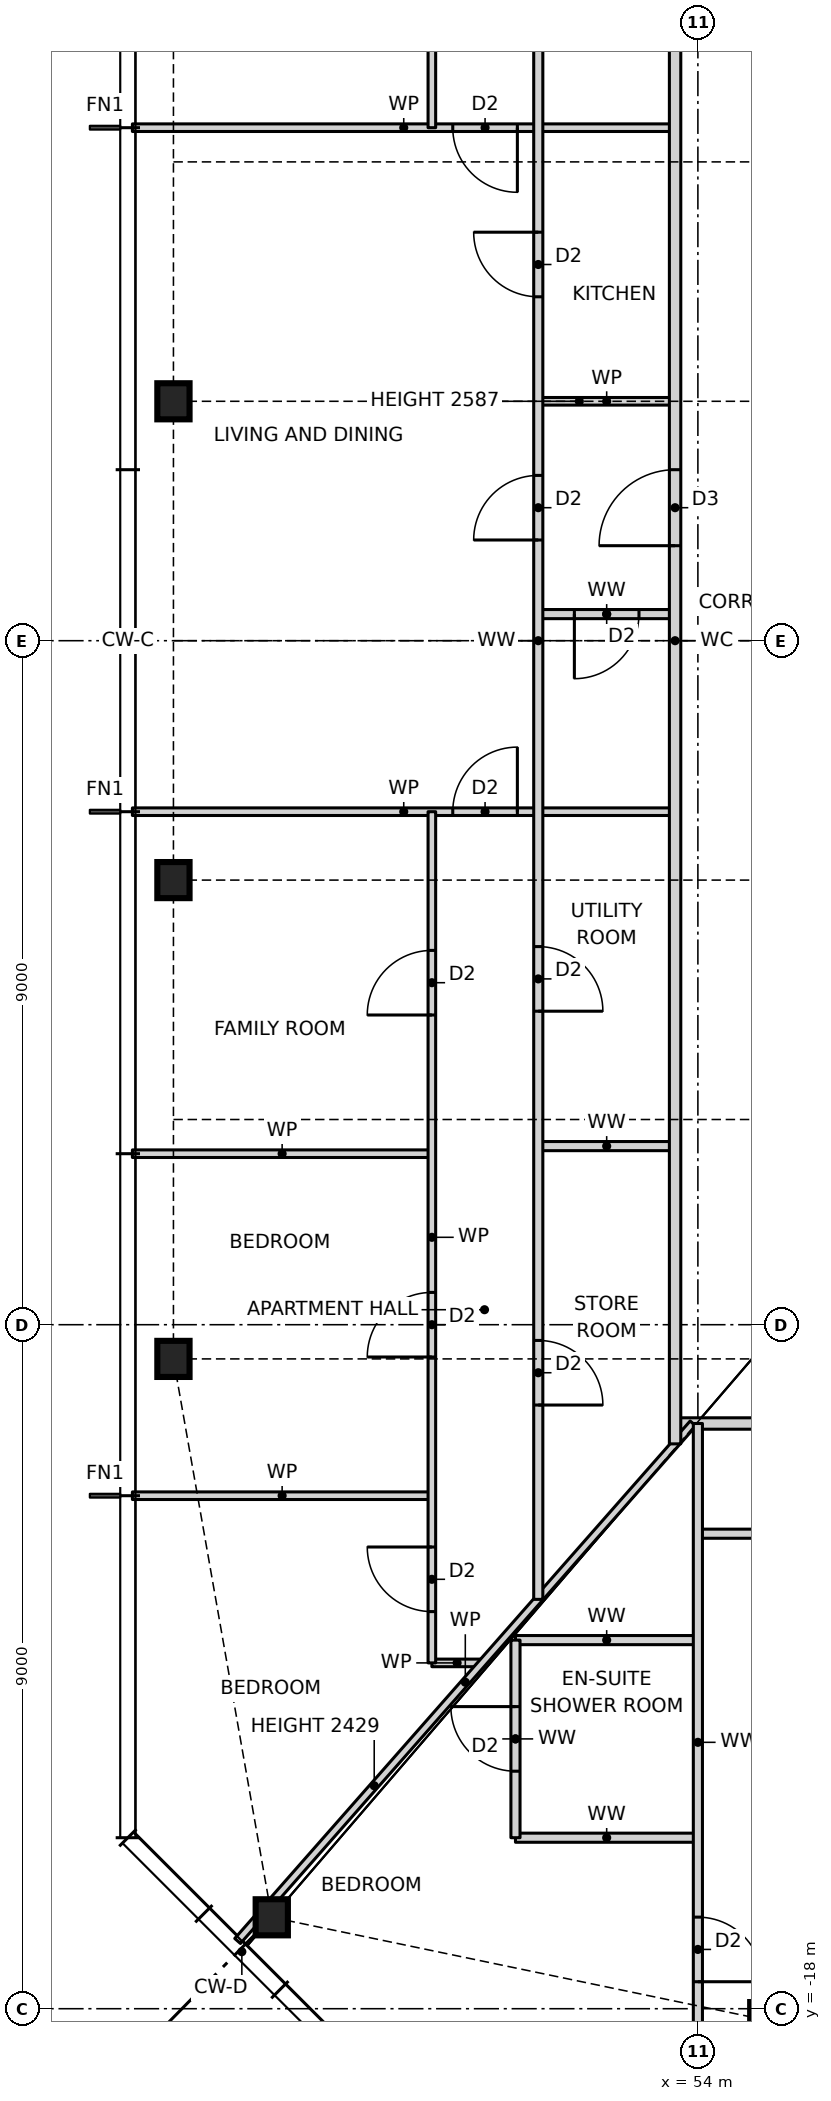
"""IFC4 building model, lengths in metres.
Left out: names, types, materials, properties, quantities, classifications, styles, units other than length and angle.
Written with IfcOpenShell. Run it as: python <this file> out.ifc"""

import sys

from ifc_helpers import new_model, si_unit, direction, frame, frame_2d, origin, origin_2d, place, context, subcontext, project, spatial, rectangle, i_section, extrude, element, fill, save


model = new_model("IFC4")
c1 = context("Model", 3, precision=1e-05, world=origin(), true_north=direction((0.0, 1.0)))
c2 = subcontext(c1, "Body", "Model", "MODEL_VIEW")
j1 = project(units=[si_unit("LENGTHUNIT", "METRE"), si_unit("PLANEANGLEUNIT", "RADIAN")], contexts=[c1])
p1 = place(None, origin())
s1 = spatial("IfcSite", under=j1, at=p1, CompositionType="ELEMENT")
p2 = place(p1, origin())
s2 = spatial("IfcBuilding", under=s1, at=p2, CompositionType="ELEMENT")
p3 = place(p2, frame((0.0, 0.0, 32.5)))
s3 = spatial("IfcBuildingStorey", under=s2, at=p3, CompositionType="ELEMENT", Elevation=32.5)
for number, where, z_axis, x_axis in (
    (1, (48.394, -16.797, 0.0), (0.0, 0.0, 1.0), (1.0, 0.0, 0.0)),
    (2, (54.9, -18.15, 0.0), (0.0, 0.0, 1.0), (1.0, 0.0, 0.0)),
    (3, (47.1, 3.15, 0.0), (0.0, 0.0, 1.0), (1.0, 0.0, 0.0)),
    (4, (47.1, -3.15, 0.0), (0.0, 0.0, 1.0), (1.0, 0.0, 0.0)),
    (5, (47.1, -9.45, 0.0), (0.0, 0.0, 1.0), (1.0, 0.0, 0.0)),
):
    element("IfcColumn", number, at=place(p3, frame(where, z_axis=z_axis, x_axis=x_axis)), inside=s3, PredefinedType="COLUMN", context=c2, shape_type="SweptSolid", body=[
        extrude(i_section(OverallWidth=0.424, OverallDepth=0.475, WebThickness=0.048, FlangeThickness=0.077, at=origin_2d()), origin(), (0.0, 0.0, 1.0), 3.5),
    ])
p4 = place(p3, frame((51.6, -15.75, 0.0), z_axis=(0.0, 0.0, 1.0), x_axis=(1.0, 0.0, 0.0)))
e6 = element("IfcWall", 6, at=p4, inside=s3, PredefinedType="PARTITIONING", context=c2, shape_type="SweptSolid", body=[
    extrude(rectangle(XDim=2.4, YDim=0.12, at=frame_2d((1.2, 0.0))), origin(), (0.0, 0.0, 1.0), 3.27),
])
p5 = place(p3, frame((50.5, -13.45, 0.0), z_axis=(0.0, 0.0, 1.0), x_axis=(1.0, 0.0, 0.0)))
e7 = element("IfcWall", 7, at=p5, inside=s3, PredefinedType="PARTITIONING", context=c2, shape_type="SweptSolid", body=[
    extrude(rectangle(XDim=0.664, YDim=0.1, at=frame_2d((0.332, 0.0))), origin(), (0.0, 0.0, 1.0), 3.27),
])
p6 = place(p3, frame((51.6, -13.15, 0.0), z_axis=(0.0, 0.0, 1.0), x_axis=(1.0, 0.0, 0.0)))
e8 = element("IfcWall", 8, at=p6, inside=s3, PredefinedType="PARTITIONING", context=c2, shape_type="SweptSolid", body=[
    extrude(rectangle(XDim=2.4, YDim=0.12, at=frame_2d((1.2, 0.0))), origin(), (0.0, 0.0, 1.0), 3.27),
])
p7 = place(p3, frame((54.0, -11.75, 0.0), z_axis=(0.0, 0.0, 1.0), x_axis=(1.0, 0.0, 0.0)))
e9 = element("IfcWall", 9, at=p7, inside=s3, PredefinedType="PARTITIONING", context=c2, shape_type="SweptSolid", body=[
    extrude(rectangle(XDim=19.34, YDim=0.12, at=frame_2d((9.67, 0.0))), origin(), (0.0, 0.0, 1.0), 3.27),
])
p8 = place(p7, frame((1.375, 0.0, 0.0)))
e10 = element("IfcOpeningElement", 10, at=p8, cuts=e9, PredefinedType="OPENING", context=c2, shape_type="SweptSolid", body=[
    extrude(rectangle(XDim=0.85, YDim=2.1, at=frame_2d((0.425, 1.05))), frame((0.0, 0.07, 0.0), z_axis=(0.0, -1.0, 0.0), x_axis=(1.0, 0.0, 0.0)), (0.0, 0.0, 1.0), 0.14),
])
p9 = place(p7, frame((4.575, 0.0, 0.0)))
e11 = element("IfcOpeningElement", 11, at=p9, cuts=e9, PredefinedType="OPENING", context=c2, shape_type="SweptSolid", body=[
    extrude(rectangle(XDim=0.85, YDim=2.1, at=frame_2d((0.425, 1.05))), frame((0.0, 0.07, 0.0), z_axis=(0.0, -1.0, 0.0), x_axis=(1.0, 0.0, 0.0)), (0.0, 0.0, 1.0), 0.14),
])
p10 = place(p7, frame((11.325, 0.0, 0.0)))
e12 = element("IfcOpeningElement", 12, at=p10, cuts=e9, PredefinedType="OPENING", context=c2, shape_type="SweptSolid", body=[
    extrude(rectangle(XDim=0.85, YDim=2.1, at=frame_2d((0.425, 1.05))), frame((0.0, 0.07, 0.0), z_axis=(0.0, -1.0, 0.0), x_axis=(1.0, 0.0, 0.0)), (0.0, 0.0, 1.0), 0.14),
])
p11 = place(p7, frame((16.495, 0.0, 0.0)))
e13 = element("IfcOpeningElement", 13, at=p11, cuts=e9, PredefinedType="OPENING", context=c2, shape_type="SweptSolid", body=[
    extrude(rectangle(XDim=0.85, YDim=2.1, at=frame_2d((0.425, 1.05))), frame((0.0, 0.07, 0.0), z_axis=(0.0, -1.0, 0.0), x_axis=(1.0, 0.0, 0.0)), (0.0, 0.0, 1.0), 0.14),
])
p12 = place(p3, frame((46.56, -11.25, 0.0), z_axis=(0.0, 0.0, 1.0), x_axis=(1.0, 0.0, 0.0)))
e14 = element("IfcWall", 14, at=p12, inside=s3, PredefinedType="PARTITIONING", context=c2, shape_type="SweptSolid", body=[
    extrude(rectangle(XDim=3.94, YDim=0.1, at=frame_2d((1.97, 0.0))), origin(), (0.0, 0.0, 1.0), 3.27),
])
p13 = place(p3, frame((53.7, -10.3, 0.0), z_axis=(0.0, 0.0, 1.0), x_axis=(1.0, 0.0, 0.0)))
e15 = element("IfcWall", 15, at=p13, inside=s3, PredefinedType="PARTITIONING", context=c2, shape_type="SweptSolid", body=[
    extrude(rectangle(XDim=18.6, YDim=0.15, at=frame_2d((9.3, 0.0))), origin(), (0.0, 0.0, 1.0), 3.27),
])
p14 = place(p13, frame((4.8, 0.0, 0.0)))
e16 = element("IfcOpeningElement", 16, at=p14, cuts=e15, PredefinedType="OPENING", context=c2, shape_type="SweptSolid", body=[
    extrude(rectangle(XDim=1.0, YDim=2.1, at=frame_2d((0.5, 1.05))), frame((0.0, 0.085, 0.0), z_axis=(0.0, -1.0, 0.0), x_axis=(1.0, 0.0, 0.0)), (0.0, 0.0, 1.0), 0.17),
])
p15 = place(p3, frame((46.56, -6.75, 0.0), z_axis=(0.0, 0.0, 1.0), x_axis=(1.0, 0.0, 0.0)))
e17 = element("IfcWall", 17, at=p15, inside=s3, PredefinedType="PARTITIONING", context=c2, shape_type="SweptSolid", body=[
    extrude(rectangle(XDim=3.94, YDim=0.1, at=frame_2d((1.97, 0.0))), origin(), (0.0, 0.0, 1.0), 3.27),
])
p16 = place(p3, frame((51.9, -6.65, 0.0), z_axis=(0.0, 0.0, 1.0), x_axis=(1.0, 0.0, 0.0)))
e18 = element("IfcWall", 18, at=p16, inside=s3, PredefinedType="PARTITIONING", context=c2, shape_type="SweptSolid", body=[
    extrude(rectangle(XDim=1.8, YDim=0.12, at=frame_2d((0.9, 0.0))), origin(), (0.0, 0.0, 1.0), 3.27),
])
p17 = place(p3, frame((46.56, -2.25, 0.0), z_axis=(0.0, 0.0, 1.0), x_axis=(1.0, 0.0, 0.0)))
e19 = element("IfcWall", 19, at=p17, inside=s3, PredefinedType="PARTITIONING", context=c2, shape_type="SweptSolid", body=[
    extrude(rectangle(XDim=7.14, YDim=0.1, at=frame_2d((3.57, 0.0))), origin(), (0.0, 0.0, 1.0), 3.27),
])
p18 = place(p17, frame((4.215, 0.0, 0.0)))
e20 = element("IfcOpeningElement", 20, at=p18, cuts=e19, PredefinedType="OPENING", context=c2, shape_type="SweptSolid", body=[
    extrude(rectangle(XDim=0.85, YDim=2.1, at=frame_2d((0.425, 1.05))), frame((0.0, 0.06, 0.0), z_axis=(0.0, -1.0, 0.0), x_axis=(1.0, 0.0, 0.0)), (0.0, 0.0, 1.0), 0.12),
])
p19 = place(p3, frame((51.9, 0.35, 0.0), z_axis=(0.0, 0.0, 1.0), x_axis=(1.0, 0.0, 0.0)))
e21 = element("IfcWall", 21, at=p19, inside=s3, PredefinedType="PARTITIONING", context=c2, shape_type="SweptSolid", body=[
    extrude(rectangle(XDim=1.8, YDim=0.12, at=frame_2d((0.9, 0.0))), origin(), (0.0, 0.0, 1.0), 3.27),
])
p20 = place(p19, frame((0.475, 0.0, 0.0)))
e22 = element("IfcOpeningElement", 22, at=p20, cuts=e21, PredefinedType="OPENING", context=c2, shape_type="SweptSolid", body=[
    extrude(rectangle(XDim=0.85, YDim=2.1, at=frame_2d((0.425, 1.05))), frame((0.0, 0.07, 0.0), z_axis=(0.0, -1.0, 0.0), x_axis=(1.0, 0.0, 0.0)), (0.0, 0.0, 1.0), 0.14),
])
p21 = place(p3, frame((51.9, 3.15, 0.0), z_axis=(0.0, 0.0, 1.0), x_axis=(1.0, 0.0, 0.0)))
e23 = element("IfcWall", 23, at=p21, inside=s3, PredefinedType="PARTITIONING", context=c2, shape_type="SweptSolid", body=[
    extrude(rectangle(XDim=1.8, YDim=0.1, at=frame_2d((0.9, 0.0))), origin(), (0.0, 0.0, 1.0), 2.587),
])
p22 = place(p3, frame((46.56, 6.75, 0.0), z_axis=(0.0, 0.0, 1.0), x_axis=(1.0, 0.0, 0.0)))
e24 = element("IfcWall", 24, at=p22, inside=s3, PredefinedType="PARTITIONING", context=c2, shape_type="SweptSolid", body=[
    extrude(rectangle(XDim=7.14, YDim=0.1, at=frame_2d((3.57, 0.0))), origin(), (0.0, 0.0, 1.0), 3.27),
])
p23 = place(p22, frame((4.215, 0.0, 0.0)))
e25 = element("IfcOpeningElement", 25, at=p23, cuts=e24, PredefinedType="OPENING", context=c2, shape_type="SweptSolid", body=[
    extrude(rectangle(XDim=0.85, YDim=2.1, at=frame_2d((0.425, 1.05))), frame((0.0, 0.06, 0.0), z_axis=(0.0, -1.0, 0.0), x_axis=(1.0, 0.0, 0.0)), (0.0, 0.0, 1.0), 0.12),
])
p24 = place(p3, frame((47.944, -17.109, 0.0), z_axis=(0.0, 0.0, 1.0), x_axis=(0.660638210404, 0.750704439146, 0.0)))
e26 = element("IfcWall", 26, at=p24, inside=s3, PredefinedType="PARTITIONING", context=c2, shape_type="SweptSolid", body=[
    extrude(rectangle(XDim=9.07, YDim=0.1, at=frame_2d((4.535, 0.0))), origin(), (0.0, 0.0, 1.0), 2.429),
])
p25 = place(p3, frame((54.0, -18.69, 0.0), z_axis=(0.0, 0.0, 1.0), x_axis=(0.0, 1.0, 0.0)))
e27 = element("IfcWall", 27, at=p25, inside=s3, PredefinedType="PARTITIONING", context=c2, shape_type="SweptSolid", body=[
    extrude(rectangle(XDim=8.39, YDim=0.12, at=frame_2d((4.195, 0.0))), origin(), (0.0, 0.0, 1.0), 3.27),
])
p26 = place(p25, frame((1.045, 0.0, 0.0)))
e28 = element("IfcOpeningElement", 28, at=p26, cuts=e27, PredefinedType="OPENING", context=c2, shape_type="SweptSolid", body=[
    extrude(rectangle(XDim=0.85, YDim=2.1, at=frame_2d((0.425, 1.05))), frame((0.0, 0.07, 0.0), z_axis=(0.0, -1.0, 0.0), x_axis=(1.0, 0.0, 0.0)), (0.0, 0.0, 1.0), 0.14),
])
p27 = place(p3, frame((53.7, -10.568, 0.0), z_axis=(0.0, 0.0, 1.0), x_axis=(0.0, 1.0, 0.0)))
e29 = element("IfcWall", 29, at=p27, inside=s3, PredefinedType="PARTITIONING", context=c2, shape_type="SweptSolid", body=[
    extrude(rectangle(XDim=21.136, YDim=0.15, at=frame_2d((10.568, 0.0))), origin(), (0.0, 0.0, 1.0), 3.27),
])
p28 = place(p27, frame((11.818, 0.0, 0.0)))
e30 = element("IfcOpeningElement", 30, at=p28, cuts=e29, PredefinedType="OPENING", context=c2, shape_type="SweptSolid", body=[
    extrude(rectangle(XDim=1.0, YDim=2.1, at=frame_2d((0.5, 1.05))), frame((0.0, 0.085, 0.0), z_axis=(0.0, -1.0, 0.0), x_axis=(1.0, 0.0, 0.0)), (0.0, 0.0, 1.0), 0.17),
])
p29 = place(p3, frame((51.9, -12.614, 0.0), z_axis=(0.0, 0.0, 1.0), x_axis=(0.0, 1.0, 0.0)))
e31 = element("IfcWall", 31, at=p29, inside=s3, PredefinedType="PARTITIONING", context=c2, shape_type="SweptSolid", body=[
    extrude(rectangle(XDim=25.228, YDim=0.12, at=frame_2d((12.614, 0.0))), origin(), (0.0, 0.0, 1.0), 3.27),
])
p30 = place(p29, frame((17.139, 0.0, 0.0)))
e32 = element("IfcOpeningElement", 32, at=p30, cuts=e31, PredefinedType="OPENING", context=c2, shape_type="SweptSolid", body=[
    extrude(rectangle(XDim=0.85, YDim=2.1, at=frame_2d((0.425, 1.05))), frame((0.0, 0.07, 0.0), z_axis=(0.0, -1.0, 0.0), x_axis=(1.0, 0.0, 0.0)), (0.0, 0.0, 1.0), 0.14),
])
p31 = place(p29, frame((13.939, 0.0, 0.0)))
e33 = element("IfcOpeningElement", 33, at=p31, cuts=e31, PredefinedType="OPENING", context=c2, shape_type="SweptSolid", body=[
    extrude(rectangle(XDim=0.85, YDim=2.1, at=frame_2d((0.425, 1.05))), frame((0.0, 0.07, 0.0), z_axis=(0.0, -1.0, 0.0), x_axis=(1.0, 0.0, 0.0)), (0.0, 0.0, 1.0), 0.14),
])
p32 = place(p29, frame((21.871, 0.0, 0.0)))
e34 = element("IfcOpeningElement", 34, at=p32, cuts=e31, PredefinedType="OPENING", context=c2, shape_type="SweptSolid", body=[
    extrude(rectangle(XDim=0.85, YDim=2.1, at=frame_2d((0.425, 1.05))), frame((0.0, 0.07, 0.0), z_axis=(0.0, -1.0, 0.0), x_axis=(1.0, 0.0, 0.0)), (0.0, 0.0, 1.0), 0.14),
])
p33 = place(p29, frame((7.739, 0.0, 0.0)))
e35 = element("IfcOpeningElement", 35, at=p33, cuts=e31, PredefinedType="OPENING", context=c2, shape_type="SweptSolid", body=[
    extrude(rectangle(XDim=0.85, YDim=2.1, at=frame_2d((0.425, 1.05))), frame((0.0, 0.07, 0.0), z_axis=(0.0, -1.0, 0.0), x_axis=(1.0, 0.0, 0.0)), (0.0, 0.0, 1.0), 0.14),
])
p34 = place(p29, frame((2.557, 0.0, 0.0)))
e36 = element("IfcOpeningElement", 36, at=p34, cuts=e31, PredefinedType="OPENING", context=c2, shape_type="SweptSolid", body=[
    extrude(rectangle(XDim=0.85, YDim=2.1, at=frame_2d((0.425, 1.05))), frame((0.0, 0.07, 0.0), z_axis=(0.0, -1.0, 0.0), x_axis=(1.0, 0.0, 0.0)), (0.0, 0.0, 1.0), 0.14),
])
p35 = place(p3, frame((51.6, -15.75, 0.0), z_axis=(0.0, 0.0, 1.0), x_axis=(0.0, 1.0, 0.0)))
e37 = element("IfcWall", 37, at=p35, inside=s3, PredefinedType="PARTITIONING", context=c2, shape_type="SweptSolid", body=[
    extrude(rectangle(XDim=2.6, YDim=0.12, at=frame_2d((1.3, 0.0))), origin(), (0.0, 0.0, 1.0), 3.27),
])
p36 = place(p35, frame((0.875, 0.0, 0.0)))
e38 = element("IfcOpeningElement", 38, at=p36, cuts=e37, PredefinedType="OPENING", context=c2, shape_type="SweptSolid", body=[
    extrude(rectangle(XDim=0.85, YDim=2.1, at=frame_2d((0.425, 1.05))), frame((0.0, 0.07, 0.0), z_axis=(0.0, -1.0, 0.0), x_axis=(1.0, 0.0, 0.0)), (0.0, 0.0, 1.0), 0.14),
])
p37 = place(p3, frame((50.5, -13.45, 0.0), z_axis=(0.0, 0.0, 1.0), x_axis=(0.0, 1.0, 0.0)))
e39 = element("IfcWall", 39, at=p37, inside=s3, PredefinedType="PARTITIONING", context=c2, shape_type="SweptSolid", body=[
    extrude(rectangle(XDim=11.2, YDim=0.1, at=frame_2d((5.6, 0.0))), origin(), (0.0, 0.0, 1.0), 3.27),
])
p38 = place(p37, frame((8.525, 0.0, 0.0)))
e40 = element("IfcOpeningElement", 40, at=p38, cuts=e39, PredefinedType="OPENING", context=c2, shape_type="SweptSolid", body=[
    extrude(rectangle(XDim=0.85, YDim=2.1, at=frame_2d((0.425, 1.05))), frame((0.0, 0.06, 0.0), z_axis=(0.0, -1.0, 0.0), x_axis=(1.0, 0.0, 0.0)), (0.0, 0.0, 1.0), 0.12),
])
p39 = place(p37, frame((4.025, 0.0, 0.0)))
e41 = element("IfcOpeningElement", 41, at=p39, cuts=e39, PredefinedType="OPENING", context=c2, shape_type="SweptSolid", body=[
    extrude(rectangle(XDim=0.85, YDim=2.1, at=frame_2d((0.425, 1.05))), frame((0.0, 0.06, 0.0), z_axis=(0.0, -1.0, 0.0), x_axis=(1.0, 0.0, 0.0)), (0.0, 0.0, 1.0), 0.12),
])
p40 = place(p37, frame((0.675, 0.0, 0.0)))
e42 = element("IfcOpeningElement", 42, at=p40, cuts=e39, PredefinedType="OPENING", context=c2, shape_type="SweptSolid", body=[
    extrude(rectangle(XDim=0.85, YDim=2.1, at=frame_2d((0.425, 1.05))), frame((0.0, 0.06, 0.0), z_axis=(0.0, -1.0, 0.0), x_axis=(1.0, 0.0, 0.0)), (0.0, 0.0, 1.0), 0.12),
])
p41 = place(p3, frame((50.5, 6.75, 0.0), z_axis=(0.0, 0.0, 1.0), x_axis=(0.0, 1.0, 0.0)))
e43 = element("IfcWall", 43, at=p41, inside=s3, PredefinedType="PARTITIONING", context=c2, shape_type="SweptSolid", body=[
    extrude(rectangle(XDim=6.7, YDim=0.1, at=frame_2d((3.35, 0.0))), origin(), (0.0, 0.0, 1.0), 3.27),
])
p42 = place(p41, frame((1.825, 0.0, 0.0)))
e44 = element("IfcOpeningElement", 44, at=p42, cuts=e43, PredefinedType="OPENING", context=c2, shape_type="SweptSolid", body=[
    extrude(rectangle(XDim=0.85, YDim=2.1, at=frame_2d((0.425, 1.05))), frame((0.0, 0.06, 0.0), z_axis=(0.0, -1.0, 0.0), x_axis=(1.0, 0.0, 0.0)), (0.0, 0.0, 1.0), 0.12),
])
p43 = place(p41, frame((5.175, 0.0, 0.0)))
e45 = element("IfcOpeningElement", 45, at=p43, cuts=e43, PredefinedType="OPENING", context=c2, shape_type="SweptSolid", body=[
    extrude(rectangle(XDim=0.85, YDim=2.1, at=frame_2d((0.425, 1.05))), frame((0.0, 0.06, 0.0), z_axis=(0.0, -1.0, 0.0), x_axis=(1.0, 0.0, 0.0)), (0.0, 0.0, 1.0), 0.12),
])
p44 = place(p36, origin())
e46 = element("IfcDoor", 46, at=p44, inside=s3, OperationType="SINGLE_SWING_RIGHT", PredefinedType="DOOR", context=c2, shape_type="SweptSolid", body=[
    extrude(rectangle(XDim=0.85, YDim=2.1, at=frame_2d((0.425, 1.05))), frame((0.0, 0.025, 0.0), z_axis=(0.0, -1.0, 0.0), x_axis=(1.0, 0.0, 0.0)), (0.0, 0.0, 1.0), 0.05),
])
fill(e38, e46)
p45 = place(p26, frame((0.85, 0.0, 0.0), z_axis=(0.0, 0.0, 1.0), x_axis=(-1.0, 0.0, 0.0)))
e47 = element("IfcDoor", 47, at=p45, inside=s3, OperationType="SINGLE_SWING_RIGHT", PredefinedType="DOOR", context=c2, shape_type="SweptSolid", body=[
    extrude(rectangle(XDim=0.85, YDim=2.1, at=frame_2d((0.425, 1.05))), frame((0.0, 0.025, 0.0), z_axis=(0.0, -1.0, 0.0), x_axis=(1.0, 0.0, 0.0)), (0.0, 0.0, 1.0), 0.05),
])
fill(e28, e47)
p46 = place(p30, origin())
e48 = element("IfcDoor", 48, at=p46, inside=s3, OperationType="SINGLE_SWING_RIGHT", PredefinedType="DOOR", context=c2, shape_type="SweptSolid", body=[
    extrude(rectangle(XDim=0.85, YDim=2.1, at=frame_2d((0.425, 1.05))), frame((0.0, 0.025, 0.0), z_axis=(0.0, -1.0, 0.0), x_axis=(1.0, 0.0, 0.0)), (0.0, 0.0, 1.0), 0.05),
])
fill(e32, e48)
p47 = place(p28, origin())
e49 = element("IfcDoor", 49, at=p47, inside=s3, OperationType="SINGLE_SWING_LEFT", PredefinedType="DOOR", context=c2, shape_type="SweptSolid", body=[
    extrude(rectangle(XDim=1.0, YDim=2.1, at=frame_2d((0.5, 1.05))), frame((0.0, 0.025, 0.0), z_axis=(0.0, -1.0, 0.0), x_axis=(1.0, 0.0, 0.0)), (0.0, 0.0, 1.0), 0.05),
])
fill(e30, e49)
p48 = place(p31, origin())
e50 = element("IfcDoor", 50, at=p48, inside=s3, OperationType="SINGLE_SWING_LEFT", PredefinedType="DOOR", context=c2, shape_type="SweptSolid", body=[
    extrude(rectangle(XDim=0.85, YDim=2.1, at=frame_2d((0.425, 1.05))), frame((0.0, 0.025, 0.0), z_axis=(0.0, -1.0, 0.0), x_axis=(1.0, 0.0, 0.0)), (0.0, 0.0, 1.0), 0.05),
])
fill(e33, e50)
p49 = place(p20, frame((0.85, 0.0, 0.0), z_axis=(0.0, 0.0, 1.0), x_axis=(-1.0, 0.0, 0.0)))
e51 = element("IfcDoor", 51, at=p49, inside=s3, OperationType="SINGLE_SWING_RIGHT", PredefinedType="DOOR", context=c2, shape_type="SweptSolid", body=[
    extrude(rectangle(XDim=0.85, YDim=2.1, at=frame_2d((0.425, 1.05))), frame((0.0, 0.025, 0.0), z_axis=(0.0, -1.0, 0.0), x_axis=(1.0, 0.0, 0.0)), (0.0, 0.0, 1.0), 0.05),
])
fill(e22, e51)
p50 = place(p23, frame((0.85, 0.0, 0.0), z_axis=(0.0, 0.0, 1.0), x_axis=(-1.0, 0.0, 0.0)))
e52 = element("IfcDoor", 52, at=p50, inside=s3, OperationType="SINGLE_SWING_LEFT", PredefinedType="DOOR", context=c2, shape_type="SweptSolid", body=[
    extrude(rectangle(XDim=0.85, YDim=2.1, at=frame_2d((0.425, 1.05))), frame((0.0, 0.025, 0.0), z_axis=(0.0, -1.0, 0.0), x_axis=(1.0, 0.0, 0.0)), (0.0, 0.0, 1.0), 0.05),
])
fill(e25, e52)
p51 = place(p18, origin())
e53 = element("IfcDoor", 53, at=p51, inside=s3, OperationType="SINGLE_SWING_RIGHT", PredefinedType="DOOR", context=c2, shape_type="SweptSolid", body=[
    extrude(rectangle(XDim=0.85, YDim=2.1, at=frame_2d((0.425, 1.05))), frame((0.0, 0.025, 0.0), z_axis=(0.0, -1.0, 0.0), x_axis=(1.0, 0.0, 0.0)), (0.0, 0.0, 1.0), 0.05),
])
fill(e20, e53)
p52 = place(p38, origin())
e54 = element("IfcDoor", 54, at=p52, inside=s3, OperationType="SINGLE_SWING_LEFT", PredefinedType="DOOR", context=c2, shape_type="SweptSolid", body=[
    extrude(rectangle(XDim=0.85, YDim=2.1, at=frame_2d((0.425, 1.05))), frame((0.0, 0.025, 0.0), z_axis=(0.0, -1.0, 0.0), x_axis=(1.0, 0.0, 0.0)), (0.0, 0.0, 1.0), 0.05),
])
fill(e40, e54)
p53 = place(p39, origin())
e55 = element("IfcDoor", 55, at=p53, inside=s3, OperationType="SINGLE_SWING_LEFT", PredefinedType="DOOR", context=c2, shape_type="SweptSolid", body=[
    extrude(rectangle(XDim=0.85, YDim=2.1, at=frame_2d((0.425, 1.05))), frame((0.0, 0.025, 0.0), z_axis=(0.0, -1.0, 0.0), x_axis=(1.0, 0.0, 0.0)), (0.0, 0.0, 1.0), 0.05),
])
fill(e41, e55)
p54 = place(p40, origin())
e56 = element("IfcDoor", 56, at=p54, inside=s3, OperationType="SINGLE_SWING_RIGHT", PredefinedType="DOOR", context=c2, shape_type="SweptSolid", body=[
    extrude(rectangle(XDim=0.85, YDim=2.1, at=frame_2d((0.425, 1.05))), frame((0.0, 0.025, 0.0), z_axis=(0.0, -1.0, 0.0), x_axis=(1.0, 0.0, 0.0)), (0.0, 0.0, 1.0), 0.05),
])
fill(e42, e56)
p55 = place(p33, frame((0.85, 0.0, 0.0), z_axis=(0.0, 0.0, 1.0), x_axis=(-1.0, 0.0, 0.0)))
e57 = element("IfcDoor", 57, at=p55, inside=s3, OperationType="SINGLE_SWING_RIGHT", PredefinedType="DOOR", context=c2, shape_type="SweptSolid", body=[
    extrude(rectangle(XDim=0.85, YDim=2.1, at=frame_2d((0.425, 1.05))), frame((0.0, 0.025, 0.0), z_axis=(0.0, -1.0, 0.0), x_axis=(1.0, 0.0, 0.0)), (0.0, 0.0, 1.0), 0.05),
])
fill(e35, e57)
p56 = place(p34, frame((0.85, 0.0, 0.0), z_axis=(0.0, 0.0, 1.0), x_axis=(-1.0, 0.0, 0.0)))
e58 = element("IfcDoor", 58, at=p56, inside=s3, OperationType="SINGLE_SWING_RIGHT", PredefinedType="DOOR", context=c2, shape_type="SweptSolid", body=[
    extrude(rectangle(XDim=0.85, YDim=2.1, at=frame_2d((0.425, 1.05))), frame((0.0, 0.025, 0.0), z_axis=(0.0, -1.0, 0.0), x_axis=(1.0, 0.0, 0.0)), (0.0, 0.0, 1.0), 0.05),
])
fill(e36, e58)
save(model, sys.argv[1])
